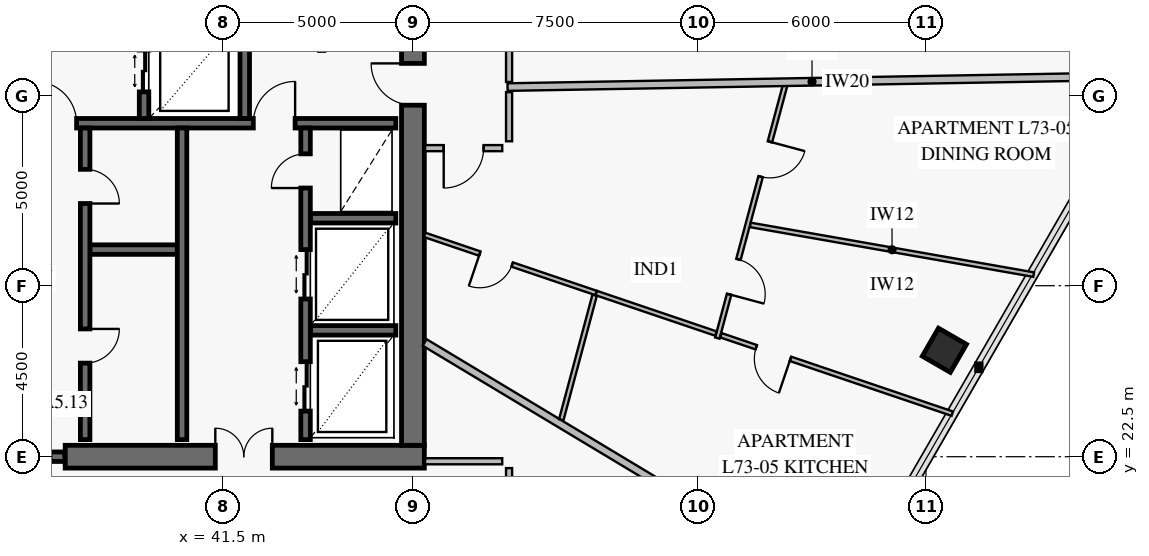
"""IFC4 building model, lengths in metres.
Left out: names, types, materials, properties, quantities, classifications, styles, units other than length and angle.
Written with IfcOpenShell. Run it as: python <this file> out.ifc"""

import sys

from ifc_helpers import new_model, si_unit, direction, frame, frame_2d, origin, origin_2d, place, context, subcontext, project, spatial, rectangle, extrude, element, fill, save


model = new_model("IFC4")
c1 = context("Model", 3, precision=1e-05, world=origin(), true_north=direction((0.0, 1.0)))
c2 = subcontext(c1, "Body", "Model", "MODEL_VIEW")
j1 = project(units=[si_unit("LENGTHUNIT", "METRE"), si_unit("PLANEANGLEUNIT", "RADIAN")], contexts=[c1])
p1 = place(None, origin())
s1 = spatial("IfcSite", under=j1, at=p1, CompositionType="ELEMENT")
p2 = place(p1, origin())
s2 = spatial("IfcBuilding", under=s1, at=p2, CompositionType="ELEMENT")
p3 = place(p2, frame((0.0, 0.0, 288.2)))
s3 = spatial("IfcBuildingStorey", under=s2, at=p3, CompositionType="ELEMENT", Elevation=288.2)
p4 = place(p3, frame((37.35, 22.5, 0.0), z_axis=(0.0, 0.0, 1.0), x_axis=(1.0, 0.0, 0.0)))
e1 = element("IfcWall", 1, at=p4, inside=s3, PredefinedType="SHEAR", context=c2, shape_type="SweptSolid", body=[
    extrude(rectangle(XDim=9.45, YDim=0.6, at=frame_2d((4.725, 0.0))), origin(), (0.0, 0.0, 1.0), 3.8),
])
p5 = place(p4, frame((3.95, 0.0, 0.0)))
e2 = element("IfcOpeningElement", 2, at=p5, cuts=e1, PredefinedType="OPENING", context=c2, shape_type="SweptSolid", body=[
    extrude(rectangle(XDim=1.5, YDim=2.15, at=frame_2d((0.75, 1.075))), frame((0.0, 0.312, 0.0), z_axis=(0.0, -1.0, 0.0), x_axis=(1.0, 0.0, 0.0)), (0.0, 0.0, 1.0), 0.624),
])
p6 = place(p3, frame((46.5, 22.8, 0.0), z_axis=(0.0, 0.0, 1.0), x_axis=(0.0, 1.0, 0.0)))
e3 = element("IfcWall", 3, at=p6, inside=s3, PredefinedType="SHEAR", context=c2, shape_type="SweptSolid", body=[
    extrude(rectangle(XDim=18.4, YDim=0.6, at=frame_2d((9.2, 0.0))), origin(), (0.0, 0.0, 1.0), 3.8),
])
p7 = place(p6, frame((8.95, 0.0, 0.0)))
e4 = element("IfcOpeningElement", 4, at=p7, cuts=e3, PredefinedType="OPENING", context=c2, shape_type="SweptSolid", body=[
    extrude(rectangle(XDim=1.1, YDim=2.15, at=frame_2d((0.55, 1.075))), frame((0.0, 0.312, 0.0), z_axis=(0.0, -1.0, 0.0), x_axis=(1.0, 0.0, 0.0)), (0.0, 0.0, 1.0), 0.624),
])
p8 = place(p3, frame((60.485, 25.301, 0.0), z_axis=(0.0, 0.0, 1.0), x_axis=(0.5, 0.866025403784, 0.0)))
e5 = element("IfcColumn", 5, at=p8, inside=s3, PredefinedType="COLUMN", context=c2, shape_type="SweptSolid", body=[
    extrude(rectangle(XDim=0.85, YDim=0.85, at=origin_2d()), origin(), (0.0, 0.0, 1.0), 3.55),
])
p9 = place(p3, frame((35.06, 22.5, 0.0), z_axis=(0.0, 0.0, 1.0), x_axis=(1.0, 0.0, 0.0)))
e6 = element("IfcWall", 6, at=p9, inside=s3, PredefinedType="SOLIDWALL", context=c2, shape_type="SweptSolid", body=[
    extrude(rectangle(XDim=2.28, YDim=0.25, at=frame_2d((1.14, 0.0))), origin(), (0.0, 0.0, 1.0), 3.8),
])
p10 = place(p9, frame((0.39, 0.0, 0.0)))
e7 = element("IfcOpeningElement", 7, at=p10, cuts=e6, PredefinedType="OPENING", context=c2, shape_type="SweptSolid", body=[
    extrude(rectangle(XDim=1.5, YDim=2.15, at=frame_2d((0.75, 1.075))), frame((0.0, 0.137, 0.0), z_axis=(0.0, -1.0, 0.0), x_axis=(1.0, 0.0, 0.0)), (0.0, 0.0, 1.0), 0.274),
])
p11 = place(p3, frame((25.95, 31.275, 0.0), z_axis=(0.0, 0.0, 1.0), x_axis=(1.0, 0.0, 0.0)))
e8 = element("IfcWall", 8, at=p11, inside=s3, PredefinedType="SOLIDWALL", context=c2, shape_type="SweptSolid", body=[
    extrude(rectangle(XDim=20.1, YDim=0.25, at=frame_2d((10.05, 0.0))), origin(), (0.0, 0.0, 1.0), 3.8),
])
p12 = place(p11, frame((2.6, 0.0, 0.0)))
e9 = element("IfcOpeningElement", 9, at=p12, cuts=e8, PredefinedType="OPENING", context=c2, shape_type="SweptSolid", body=[
    extrude(rectangle(XDim=1.1, YDim=2.15, at=frame_2d((0.55, 1.075))), frame((0.0, 0.137, 0.0), z_axis=(0.0, -1.0, 0.0), x_axis=(1.0, 0.0, 0.0)), (0.0, 0.0, 1.0), 0.274),
])
p13 = place(p11, frame((10.6, 0.0, 0.0)))
e10 = element("IfcOpeningElement", 10, at=p13, cuts=e8, PredefinedType="OPENING", context=c2, shape_type="SweptSolid", body=[
    extrude(rectangle(XDim=1.1, YDim=2.15, at=frame_2d((0.55, 1.075))), frame((0.0, 0.137, 0.0), z_axis=(0.0, -1.0, 0.0), x_axis=(1.0, 0.0, 0.0)), (0.0, 0.0, 1.0), 0.274),
])
p14 = place(p11, frame((16.35, 0.0, 0.0)))
e11 = element("IfcOpeningElement", 11, at=p14, cuts=e8, PredefinedType="OPENING", context=c2, shape_type="SweptSolid", body=[
    extrude(rectangle(XDim=1.1, YDim=2.15, at=frame_2d((0.55, 1.075))), frame((0.0, 0.137, 0.0), z_axis=(0.0, -1.0, 0.0), x_axis=(1.0, 0.0, 0.0)), (0.0, 0.0, 1.0), 0.274),
])
p15 = place(p3, frame((42.075, 31.4, 0.0), z_axis=(0.0, 0.0, 1.0), x_axis=(0.0, 1.0, 0.0)))
e12 = element("IfcWall", 12, at=p15, inside=s3, PredefinedType="SOLIDWALL", context=c2, shape_type="SweptSolid", body=[
    extrude(rectangle(XDim=9.7, YDim=0.25, at=frame_2d((4.85, 0.0))), origin(), (0.0, 0.0, 1.0), 3.8),
])
p16 = place(p3, frame((39.425, 31.4, 0.0), z_axis=(0.0, 0.0, 1.0), x_axis=(0.0, 1.0, 0.0)))
e13 = element("IfcWall", 13, at=p16, inside=s3, PredefinedType="SOLIDWALL", context=c2, shape_type="SweptSolid", body=[
    extrude(rectangle(XDim=9.65, YDim=0.25, at=frame_2d((4.825, 0.0))), origin(), (0.0, 0.0, 1.0), 3.8),
])
p17 = place(p16, frame((0.7, 0.0, 0.0)))
e14 = element("IfcOpeningElement", 14, at=p17, cuts=e13, PredefinedType="OPENING", context=c2, shape_type="SweptSolid", body=[
    extrude(rectangle(XDim=1.1, YDim=2.2, at=frame_2d((0.55, 1.1))), frame((0.0, 0.137, 0.0), z_axis=(0.0, -1.0, 0.0), x_axis=(1.0, 0.0, 0.0)), (0.0, 0.0, 1.0), 0.274),
])
p18 = place(p16, frame((3.45, 0.0, 0.0)))
e15 = element("IfcOpeningElement", 15, at=p18, cuts=e13, PredefinedType="OPENING", context=c2, shape_type="SweptSolid", body=[
    extrude(rectangle(XDim=1.1, YDim=2.2, at=frame_2d((0.55, 1.1))), frame((0.0, 0.137, 0.0), z_axis=(0.0, -1.0, 0.0), x_axis=(1.0, 0.0, 0.0)), (0.0, 0.0, 1.0), 0.274),
])
p19 = place(p16, frame((6.2, 0.0, 0.0)))
e16 = element("IfcOpeningElement", 16, at=p19, cuts=e13, PredefinedType="OPENING", context=c2, shape_type="SweptSolid", body=[
    extrude(rectangle(XDim=1.1, YDim=2.2, at=frame_2d((0.55, 1.1))), frame((0.0, 0.137, 0.0), z_axis=(0.0, -1.0, 0.0), x_axis=(1.0, 0.0, 0.0)), (0.0, 0.0, 1.0), 0.274),
])
p20 = place(p16, frame((8.47, 0.0, 0.0)))
e17 = element("IfcOpeningElement", 17, at=p20, cuts=e13, PredefinedType="OPENING", context=c2, shape_type="SweptSolid", body=[
    extrude(rectangle(XDim=0.9, YDim=2.1, at=frame_2d((0.45, 1.05))), frame((0.0, 0.137, 0.0), z_axis=(0.0, -1.0, 0.0), x_axis=(1.0, 0.0, 0.0)), (0.0, 0.0, 1.0), 0.274),
])
p21 = place(p3, frame((38.0, 27.95, 0.0), z_axis=(0.0, 0.0, 1.0), x_axis=(1.0, 0.0, 0.0)))
e18 = element("IfcWall", 18, at=p21, inside=s3, PredefinedType="SOLIDWALL", context=c2, shape_type="SweptSolid", body=[
    extrude(rectangle(XDim=2.3, YDim=0.25, at=frame_2d((1.15, 0.0))), origin(), (0.0, 0.0, 1.0), 3.8),
])
p22 = place(p3, frame((37.875, 22.95, 0.0), z_axis=(0.0, 0.0, 1.0), x_axis=(0.0, 1.0, 0.0)))
e19 = element("IfcWall", 19, at=p22, inside=s3, PredefinedType="SOLIDWALL", context=c2, shape_type="SweptSolid", body=[
    extrude(rectangle(XDim=8.2, YDim=0.25, at=frame_2d((4.1, 0.0))), origin(), (0.0, 0.0, 1.0), 3.8),
])
p23 = place(p22, frame((2.012, 0.0, 0.0)))
e20 = element("IfcOpeningElement", 20, at=p23, cuts=e19, PredefinedType="OPENING", context=c2, shape_type="SweptSolid", body=[
    extrude(rectangle(XDim=0.9, YDim=2.1, at=frame_2d((0.45, 1.05))), frame((0.0, 0.137, 0.0), z_axis=(0.0, -1.0, 0.0), x_axis=(1.0, 0.0, 0.0)), (0.0, 0.0, 1.0), 0.274),
])
p24 = place(p22, frame((6.212, 0.0, 0.0)))
e21 = element("IfcOpeningElement", 21, at=p24, cuts=e19, PredefinedType="OPENING", context=c2, shape_type="SweptSolid", body=[
    extrude(rectangle(XDim=0.9, YDim=2.1, at=frame_2d((0.45, 1.05))), frame((0.0, 0.137, 0.0), z_axis=(0.0, -1.0, 0.0), x_axis=(1.0, 0.0, 0.0)), (0.0, 0.0, 1.0), 0.274),
])
p25 = place(p3, frame((40.425, 22.95, 0.0), z_axis=(0.0, 0.0, 1.0), x_axis=(0.0, 1.0, 0.0)))
e22 = element("IfcWall", 22, at=p25, inside=s3, PredefinedType="SOLIDWALL", context=c2, shape_type="SweptSolid", body=[
    extrude(rectangle(XDim=8.2, YDim=0.25, at=frame_2d((4.1, 0.0))), origin(), (0.0, 0.0, 1.0), 3.8),
])
for number, where, z_axis, x_axis in (
    (23, (43.8, 25.825, 0.0), (0.0, 0.0, 1.0), (1.0, 0.0, 0.0)),
    (24, (43.8, 28.775, 0.0), (0.0, 0.0, 1.0), (1.0, 0.0, 0.0)),
):
    element("IfcWall", number, at=place(p3, frame(where, z_axis=z_axis, x_axis=x_axis)), inside=s3, PredefinedType="SOLIDWALL", context=c2, shape_type="SweptSolid", body=[
        extrude(rectangle(XDim=2.25, YDim=0.25, at=frame_2d((1.125, 0.0))), origin(), (0.0, 0.0, 1.0), 3.8),
    ])
p26 = place(p3, frame((43.675, 22.95, 0.0), z_axis=(0.0, 0.0, 1.0), x_axis=(0.0, 1.0, 0.0)))
e25 = element("IfcWall", 25, at=p26, inside=s3, PredefinedType="SOLIDWALL", context=c2, shape_type="SweptSolid", body=[
    extrude(rectangle(XDim=8.2, YDim=0.25, at=frame_2d((4.1, 0.0))), origin(), (0.0, 0.0, 1.0), 3.8),
])
p27 = place(p26, frame((0.75, 0.0, 0.0)))
e26 = element("IfcOpeningElement", 26, at=p27, cuts=e25, PredefinedType="OPENING", context=c2, shape_type="SweptSolid", body=[
    extrude(rectangle(XDim=1.3, YDim=2.3, at=frame_2d((0.65, 1.15))), frame((0.0, 0.137, 0.0), z_axis=(0.0, -1.0, 0.0), x_axis=(1.0, 0.0, 0.0)), (0.0, 0.0, 1.0), 0.274),
])
p28 = place(p26, frame((3.7, 0.0, 0.0)))
e27 = element("IfcOpeningElement", 27, at=p28, cuts=e25, PredefinedType="OPENING", context=c2, shape_type="SweptSolid", body=[
    extrude(rectangle(XDim=1.3, YDim=2.3, at=frame_2d((0.65, 1.15))), frame((0.0, 0.137, 0.0), z_axis=(0.0, -1.0, 0.0), x_axis=(1.0, 0.0, 0.0)), (0.0, 0.0, 1.0), 0.274),
])
p29 = place(p26, frame((6.62, 0.0, 0.0)))
e28 = element("IfcOpeningElement", 28, at=p29, cuts=e25, PredefinedType="OPENING", context=c2, shape_type="SweptSolid", body=[
    extrude(rectangle(XDim=0.9, YDim=2.1, at=frame_2d((0.45, 1.05))), frame((0.0, 0.137, 0.0), z_axis=(0.0, -1.0, 0.0), x_axis=(1.0, 0.0, 0.0)), (0.0, 0.0, 1.0), 0.274),
])
p30 = place(p3, frame((54.51, 25.622, 0.0), z_axis=(0.0, 0.0, 1.0), x_axis=(0.258833493947, 0.965921954617, 0.0)))
e29 = element("IfcWall", 29, at=p30, inside=s3, PredefinedType="PARTITIONING", context=c2, shape_type="SweptSolid", body=[
    extrude(rectangle(XDim=6.89, YDim=0.12, at=frame_2d((3.445, 0.0))), origin(), (0.0, 0.0, 1.0), 2.95),
])
p31 = place(p30, frame((1.193, 0.0, 0.0)))
e30 = element("IfcOpeningElement", 30, at=p31, cuts=e29, PredefinedType="OPENING", context=c2, shape_type="SweptSolid", body=[
    extrude(rectangle(XDim=0.95, YDim=2.1, at=frame_2d((0.475, 1.05))), frame((0.0, 0.072, 0.0), z_axis=(0.0, -1.0, 0.0), x_axis=(1.0, 0.0, 0.0)), (0.0, 0.0, 1.0), 0.144),
])
p32 = place(p30, frame((4.398, 0.0, 0.0)))
e31 = element("IfcOpeningElement", 31, at=p32, cuts=e29, PredefinedType="OPENING", context=c2, shape_type="SweptSolid", body=[
    extrude(rectangle(XDim=0.95, YDim=2.1, at=frame_2d((0.475, 1.05))), frame((0.0, 0.072, 0.0), z_axis=(0.0, -1.0, 0.0), x_axis=(1.0, 0.0, 0.0)), (0.0, 0.0, 1.0), 0.144),
])
p33 = place(p3, frame((46.808, 28.337, 0.0), z_axis=(0.0, 0.0, 1.0), x_axis=(0.947109682019, -0.320910034474, 0.0)))
e32 = element("IfcWall", 32, at=p33, inside=s3, PredefinedType="PARTITIONING", context=c2, shape_type="SweptSolid", body=[
    extrude(rectangle(XDim=4.767, YDim=0.12, at=frame_2d((2.384, 0.0))), origin(), (0.0, 0.0, 1.0), 3.55),
])
p34 = place(p33, frame((1.533, 0.0, 0.0)))
e33 = element("IfcOpeningElement", 33, at=p34, cuts=e32, PredefinedType="OPENING", context=c2, shape_type="SweptSolid", body=[
    extrude(rectangle(XDim=0.9, YDim=2.1, at=frame_2d((0.45, 1.05))), frame((0.0, 0.072, 0.0), z_axis=(0.0, -1.0, 0.0), x_axis=(1.0, 0.0, 0.0)), (0.0, 0.0, 1.0), 0.144),
])
p35 = place(p3, frame((51.323, 26.808, 0.0), z_axis=(0.0, 0.0, 1.0), x_axis=(0.947092742831, -0.320960023175, 0.0)))
e34 = element("IfcWall", 34, at=p35, inside=s3, PredefinedType="PARTITIONING", context=c2, shape_type="SweptSolid", body=[
    extrude(rectangle(XDim=3.325, YDim=0.12, at=frame_2d((1.663, 0.0))), origin(), (0.0, 0.0, 1.0), 3.15),
])
p36 = place(p3, frame((54.601, 25.697, 0.0), z_axis=(0.0, 0.0, 1.0), x_axis=(0.947084656941, -0.320983882128, 0.0)))
e35 = element("IfcWall", 35, at=p36, inside=s3, PredefinedType="PARTITIONING", context=c2, shape_type="SweptSolid", body=[
    extrude(rectangle(XDim=6.432, YDim=0.12, at=frame_2d((3.216, 0.0))), origin(), (0.0, 0.0, 1.0), 2.93),
])
p37 = place(p36, frame((0.985, 0.0, 0.0)))
e36 = element("IfcOpeningElement", 36, at=p37, cuts=e35, PredefinedType="OPENING", context=c2, shape_type="SweptSolid", body=[
    extrude(rectangle(XDim=0.95, YDim=2.1, at=frame_2d((0.475, 1.05))), frame((0.0, 0.072, 0.0), z_axis=(0.0, -1.0, 0.0), x_axis=(1.0, 0.0, 0.0)), (0.0, 0.0, 1.0), 0.144),
])
p38 = place(p3, frame((46.82, 30.62, 0.0), z_axis=(0.0, 0.0, 1.0), x_axis=(1.0, 0.0, 0.0)))
e37 = element("IfcWall", 37, at=p38, inside=s3, PredefinedType="PARTITIONING", context=c2, shape_type="SweptSolid", body=[
    extrude(rectangle(XDim=2.03, YDim=0.16, at=frame_2d((1.015, 0.0))), origin(), (0.0, 0.0, 1.0), 3.55),
])
p39 = place(p38, frame((0.49, 0.0, 0.0)))
e38 = element("IfcOpeningElement", 38, at=p39, cuts=e37, PredefinedType="OPENING", context=c2, shape_type="SweptSolid", body=[
    extrude(rectangle(XDim=1.05, YDim=2.15, at=frame_2d((0.525, 1.075))), frame((0.0, 0.092, 0.0), z_axis=(0.0, -1.0, 0.0), x_axis=(1.0, 0.0, 0.0)), (0.0, 0.0, 1.0), 0.184),
])
p40 = place(p3, frame((49.03, 32.361, 0.0), z_axis=(0.0, 0.0, 1.0), x_axis=(0.0, 1.0, 0.0)))
e39 = element("IfcWall", 39, at=p40, inside=s3, PredefinedType="PARTITIONING", context=c2, shape_type="SweptSolid", body=[
    extrude(rectangle(XDim=2.694, YDim=0.16, at=frame_2d((1.347, 0.0))), origin(), (0.0, 0.0, 1.0), 3.55),
])
p41 = place(p40, frame((0.822, 0.0, 0.0)))
e40 = element("IfcOpeningElement", 40, at=p41, cuts=e39, PredefinedType="OPENING", context=c2, shape_type="SweptSolid", body=[
    extrude(rectangle(XDim=1.05, YDim=2.15, at=frame_2d((0.525, 1.075))), frame((0.0, 0.092, 0.0), z_axis=(0.0, -1.0, 0.0), x_axis=(1.0, 0.0, 0.0)), (0.0, 0.0, 1.0), 0.184),
])
p42 = place(p3, frame((46.808, 25.506, 0.0), z_axis=(0.0, 0.0, 1.0), x_axis=(0.85716526059, -0.515041470212, 0.0)))
e41 = element("IfcWall", 41, at=p42, inside=s3, PredefinedType="PARTITIONING", context=c2, shape_type="SweptSolid", body=[
    extrude(rectangle(XDim=12.958, YDim=0.2, at=frame_2d((6.479, 0.0))), origin(), (0.0, 0.0, 1.0), 2.93),
])
p43 = place(p3, frame((55.379, 28.6, 0.0), z_axis=(0.0, 0.0, 1.0), x_axis=(0.984955483735, -0.172808260973, 0.0)))
e42 = element("IfcWall", 42, at=p43, inside=s3, PredefinedType="PARTITIONING", context=c2, shape_type="SweptSolid", body=[
    extrude(rectangle(XDim=7.57, YDim=0.12, at=frame_2d((3.785, 0.0))), origin(), (0.0, 0.0, 1.0), 2.93),
])
p44 = place(p3, frame((50.403, 23.472, 0.0), z_axis=(0.0, 0.0, 1.0), x_axis=(0.25876844848, 0.965939382193, 0.0)))
e43 = element("IfcWall", 43, at=p44, inside=s3, PredefinedType="PARTITIONING", context=c2, shape_type="SweptSolid", body=[
    extrude(rectangle(XDim=3.394, YDim=0.12, at=frame_2d((1.697, 0.0))), origin(), (0.0, 0.0, 1.0), 3.55),
])
p45 = place(p3, frame((48.99, 32.227, 0.0), z_axis=(0.0, 0.0, 1.0), x_axis=(0.999847852854, 0.01744336962, 0.0)))
e44 = element("IfcWall", 44, at=p45, inside=s3, PredefinedType="PARTITIONING", context=c2, shape_type="SweptSolid", body=[
    extrude(rectangle(XDim=16.026, YDim=0.2, at=frame_2d((8.013, 0.0))), origin(), (0.0, 0.0, 1.0), 2.93),
])
p46 = place(p3, frame((49.03, 20.15, 0.0), z_axis=(0.0, 0.0, 1.0), x_axis=(0.0, 1.0, 0.0)))
e45 = element("IfcWall", 45, at=p46, inside=s3, PredefinedType="PARTITIONING", context=c2, shape_type="SweptSolid", body=[
    extrude(rectangle(XDim=2.05, YDim=0.16, at=frame_2d((1.025, 0.0))), origin(), (0.0, 0.0, 1.0), 3.55),
])
p47 = place(p3, frame((48.85, 22.38, 0.0), z_axis=(0.0, 0.0, 1.0), x_axis=(-1.0, 0.0, 0.0)))
e46 = element("IfcWall", 46, at=p47, inside=s3, PredefinedType="PARTITIONING", context=c2, shape_type="SweptSolid", body=[
    extrude(rectangle(XDim=2.03, YDim=0.16, at=frame_2d((1.015, 0.0))), origin(), (0.0, 0.0, 1.0), 3.55),
])
p48 = place(p3, frame((49.03, 30.8, 0.0), z_axis=(0.0, 0.0, 1.0), x_axis=(0.0, 1.0, 0.0)))
e47 = element("IfcWall", 47, at=p48, inside=s3, PredefinedType="PARTITIONING", context=c2, shape_type="SweptSolid", body=[
    extrude(rectangle(XDim=1.294, YDim=0.16, at=frame_2d((0.647, 0.0))), origin(), (0.0, 0.0, 1.0), 3.55),
])
p49 = place(p7, origin())
e48 = element("IfcDoor", 48, at=p49, inside=s3, OperationType="SINGLE_SWING_RIGHT", PredefinedType="USERDEFINED", context=c2, shape_type="SweptSolid", body=[
    extrude(rectangle(XDim=1.1, YDim=2.15, at=frame_2d((0.55, 1.075))), frame((0.0, 0.025, 0.0), z_axis=(0.0, -1.0, 0.0), x_axis=(1.0, 0.0, 0.0)), (0.0, 0.0, 1.0), 0.05),
])
fill(e4, e48)
p50 = place(p5, origin())
e49 = element("IfcDoor", 49, at=p50, inside=s3, OperationType="DOUBLE_DOOR_SINGLE_SWING", PredefinedType="DOOR", context=c2, shape_type="SweptSolid", body=[
    extrude(rectangle(XDim=1.5, YDim=2.15, at=frame_2d((0.75, 1.075))), frame((0.0, 0.025, 0.0), z_axis=(0.0, -1.0, 0.0), x_axis=(1.0, 0.0, 0.0)), (0.0, 0.0, 1.0), 0.05),
])
fill(e2, e49)
p51 = place(p13, origin())
e50 = element("IfcDoor", 50, at=p51, inside=s3, OperationType="SINGLE_SWING_LEFT", PredefinedType="USERDEFINED", context=c2, shape_type="SweptSolid", body=[
    extrude(rectangle(XDim=1.1, YDim=2.15, at=frame_2d((0.55, 1.075))), frame((0.0, 0.025, 0.0), z_axis=(0.0, -1.0, 0.0), x_axis=(1.0, 0.0, 0.0)), (0.0, 0.0, 1.0), 0.05),
])
fill(e10, e50)
p52 = place(p14, origin())
e51 = element("IfcDoor", 51, at=p52, inside=s3, OperationType="SINGLE_SWING_RIGHT", PredefinedType="USERDEFINED", context=c2, shape_type="SweptSolid", body=[
    extrude(rectangle(XDim=1.1, YDim=2.15, at=frame_2d((0.55, 1.075))), frame((0.0, 0.025, 0.0), z_axis=(0.0, -1.0, 0.0), x_axis=(1.0, 0.0, 0.0)), (0.0, 0.0, 1.0), 0.05),
])
fill(e11, e51)
p53 = place(p17, origin())
e52 = element("IfcDoor", 52, at=p53, inside=s3, OperationType="DOUBLE_DOOR_SLIDING", PredefinedType="DOOR", context=c2, shape_type="SweptSolid", body=[
    extrude(rectangle(XDim=1.1, YDim=2.2, at=frame_2d((0.55, 1.1))), frame((0.0, 0.025, 0.0), z_axis=(0.0, -1.0, 0.0), x_axis=(1.0, 0.0, 0.0)), (0.0, 0.0, 1.0), 0.05),
])
fill(e14, e52)
p54 = place(p23, frame((0.9, 0.0, 0.0), z_axis=(0.0, 0.0, 1.0), x_axis=(-1.0, 0.0, 0.0)))
e53 = element("IfcDoor", 53, at=p54, inside=s3, OperationType="SINGLE_SWING_LEFT", PredefinedType="DOOR", context=c2, shape_type="SweptSolid", body=[
    extrude(rectangle(XDim=0.9, YDim=2.1, at=frame_2d((0.45, 1.05))), frame((0.0, 0.025, 0.0), z_axis=(0.0, -1.0, 0.0), x_axis=(1.0, 0.0, 0.0)), (0.0, 0.0, 1.0), 0.05),
])
fill(e20, e53)
p55 = place(p24, frame((0.9, 0.0, 0.0), z_axis=(0.0, 0.0, 1.0), x_axis=(-1.0, 0.0, 0.0)))
e54 = element("IfcDoor", 54, at=p55, inside=s3, OperationType="SINGLE_SWING_RIGHT", PredefinedType="DOOR", context=c2, shape_type="SweptSolid", body=[
    extrude(rectangle(XDim=0.9, YDim=2.1, at=frame_2d((0.45, 1.05))), frame((0.0, 0.025, 0.0), z_axis=(0.0, -1.0, 0.0), x_axis=(1.0, 0.0, 0.0)), (0.0, 0.0, 1.0), 0.05),
])
fill(e21, e54)
p56 = place(p27, origin())
e55 = element("IfcDoor", 55, at=p56, inside=s3, OperationType="DOUBLE_DOOR_SLIDING", PredefinedType="DOOR", context=c2, shape_type="SweptSolid", body=[
    extrude(rectangle(XDim=1.3, YDim=2.3, at=frame_2d((0.65, 1.15))), frame((0.0, 0.025, 0.0), z_axis=(0.0, -1.0, 0.0), x_axis=(1.0, 0.0, 0.0)), (0.0, 0.0, 1.0), 0.05),
])
fill(e26, e55)
p57 = place(p28, origin())
e56 = element("IfcDoor", 56, at=p57, inside=s3, OperationType="DOUBLE_DOOR_SLIDING", PredefinedType="DOOR", context=c2, shape_type="SweptSolid", body=[
    extrude(rectangle(XDim=1.3, YDim=2.3, at=frame_2d((0.65, 1.15))), frame((0.0, 0.025, 0.0), z_axis=(0.0, -1.0, 0.0), x_axis=(1.0, 0.0, 0.0)), (0.0, 0.0, 1.0), 0.05),
])
fill(e27, e56)
p58 = place(p29, origin())
e57 = element("IfcDoor", 57, at=p58, inside=s3, OperationType="SINGLE_SWING_LEFT", PredefinedType="DOOR", context=c2, shape_type="SweptSolid", body=[
    extrude(rectangle(XDim=0.9, YDim=2.1, at=frame_2d((0.45, 1.05))), frame((0.0, 0.025, 0.0), z_axis=(0.0, -1.0, 0.0), x_axis=(1.0, 0.0, 0.0)), (0.0, 0.0, 1.0), 0.05),
])
fill(e28, e57)
p59 = place(p31, frame((0.95, 0.0, 0.0), z_axis=(0.0, 0.0, 1.0), x_axis=(-1.0, 0.0, 0.0)))
e58 = element("IfcDoor", 58, at=p59, inside=s3, OperationType="SINGLE_SWING_RIGHT", PredefinedType="DOOR", context=c2, shape_type="SweptSolid", body=[
    extrude(rectangle(XDim=0.95, YDim=2.1, at=frame_2d((0.475, 1.05))), frame((0.0, 0.025, 0.0), z_axis=(0.0, -1.0, 0.0), x_axis=(1.0, 0.0, 0.0)), (0.0, 0.0, 1.0), 0.05),
])
fill(e30, e58)
p60 = place(p32, frame((0.95, 0.0, 0.0), z_axis=(0.0, 0.0, 1.0), x_axis=(-1.0, 0.0, 0.0)))
e59 = element("IfcDoor", 59, at=p60, inside=s3, OperationType="SINGLE_SWING_LEFT", PredefinedType="DOOR", context=c2, shape_type="SweptSolid", body=[
    extrude(rectangle(XDim=0.95, YDim=2.1, at=frame_2d((0.475, 1.05))), frame((0.0, 0.025, 0.0), z_axis=(0.0, -1.0, 0.0), x_axis=(1.0, 0.0, 0.0)), (0.0, 0.0, 1.0), 0.05),
])
fill(e31, e59)
p61 = place(p34, frame((0.9, 0.0, 0.0), z_axis=(0.0, 0.0, 1.0), x_axis=(-1.0, 0.0, 0.0)))
e60 = element("IfcDoor", 60, at=p61, inside=s3, OperationType="SINGLE_SWING_RIGHT", PredefinedType="DOOR", context=c2, shape_type="SweptSolid", body=[
    extrude(rectangle(XDim=0.9, YDim=2.1, at=frame_2d((0.45, 1.05))), frame((0.0, 0.025, 0.0), z_axis=(0.0, -1.0, 0.0), x_axis=(1.0, 0.0, 0.0)), (0.0, 0.0, 1.0), 0.05),
])
fill(e33, e60)
p62 = place(p37, frame((0.95, 0.0, 0.0), z_axis=(0.0, 0.0, 1.0), x_axis=(-1.0, 0.0, 0.0)))
e61 = element("IfcDoor", 61, at=p62, inside=s3, OperationType="SINGLE_SWING_LEFT", PredefinedType="DOOR", context=c2, shape_type="SweptSolid", body=[
    extrude(rectangle(XDim=0.95, YDim=2.1, at=frame_2d((0.475, 1.05))), frame((0.0, 0.025, 0.0), z_axis=(0.0, -1.0, 0.0), x_axis=(1.0, 0.0, 0.0)), (0.0, 0.0, 1.0), 0.05),
])
fill(e36, e61)
p63 = place(p39, frame((1.05, 0.0, 0.0), z_axis=(0.0, 0.0, 1.0), x_axis=(-1.0, 0.0, 0.0)))
e62 = element("IfcDoor", 62, at=p63, inside=s3, OperationType="SINGLE_SWING_RIGHT", PredefinedType="DOOR", context=c2, shape_type="SweptSolid", body=[
    extrude(rectangle(XDim=1.05, YDim=2.15, at=frame_2d((0.525, 1.075))), frame((0.0, 0.025, 0.0), z_axis=(0.0, -1.0, 0.0), x_axis=(1.0, 0.0, 0.0)), (0.0, 0.0, 1.0), 0.05),
])
fill(e38, e62)
save(model, sys.argv[1])
